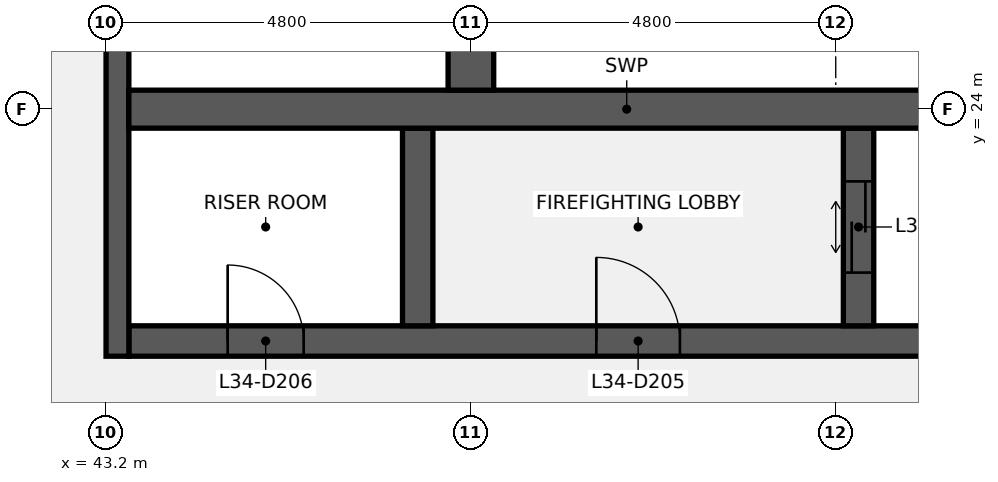
"""IFC4 building model, lengths in metres.
Left out: names, types, materials, properties, quantities, classifications, styles, units other than length and angle.
Written with IfcOpenShell. Run it as: python <this file> out.ifc"""

import sys

from ifc_helpers import new_model, si_unit, direction, frame, frame_2d, origin, place, context, subcontext, project, spatial, rectangle, extrude, element, fill, save


model = new_model("IFC4")
c1 = context("Model", 3, precision=1e-05, world=origin(), true_north=direction((0.0, 1.0)))
c2 = subcontext(c1, "Body", "Model", "MODEL_VIEW")
j1 = project(units=[si_unit("LENGTHUNIT", "METRE"), si_unit("PLANEANGLEUNIT", "RADIAN")], contexts=[c1])
p1 = place(None, origin())
s1 = spatial("IfcSite", under=j1, at=p1, CompositionType="ELEMENT")
p2 = place(p1, origin())
s2 = spatial("IfcBuilding", under=s1, at=p2, CompositionType="ELEMENT")
p3 = place(p2, frame((0.0, 0.0, 156.1)))
s3 = spatial("IfcBuildingStorey", under=s2, at=p3, CompositionType="ELEMENT", Elevation=156.1)
p4 = place(p3, frame((43.5, 20.95, 0.0), z_axis=(0.0, 0.0, 1.0), x_axis=(1.0, 0.0, 0.0)))
e1 = element("IfcWall", 1, at=p4, inside=s3, PredefinedType="SHEAR", context=c2, shape_type="SweptSolid", body=[
    extrude(rectangle(XDim=13.1, YDim=0.4, at=frame_2d((6.55, 0.0))), origin(), (0.0, 0.0, 1.0), 3.84),
])
p5 = place(p4, frame((6.15, 0.0, 0.0)))
e2 = element("IfcOpeningElement", 2, at=p5, cuts=e1, PredefinedType="OPENING", context=c2, shape_type="SweptSolid", body=[
    extrude(rectangle(XDim=1.1, YDim=2.1, at=frame_2d((0.55, 1.05))), frame((0.0, 0.21, 0.0), z_axis=(0.0, -1.0, 0.0), x_axis=(1.0, 0.0, 0.0)), (0.0, 0.0, 1.0), 0.42),
])
p6 = place(p4, frame((1.3, 0.0, 0.0)))
e3 = element("IfcOpeningElement", 3, at=p6, cuts=e1, PredefinedType="OPENING", context=c2, shape_type="SweptSolid", body=[
    extrude(rectangle(XDim=1.0, YDim=2.1, at=frame_2d((0.5, 1.05))), frame((0.0, 0.21, 0.0), z_axis=(0.0, -1.0, 0.0), x_axis=(1.0, 0.0, 0.0)), (0.0, 0.0, 1.0), 0.42),
])
p7 = place(p3, frame((43.35, 20.75, 0.0), z_axis=(0.0, 0.0, 1.0), x_axis=(0.0, 1.0, 0.0)))
e4 = element("IfcWall", 4, at=p7, inside=s3, PredefinedType="SHEAR", context=c2, shape_type="SweptSolid", body=[
    extrude(rectangle(XDim=6.5, YDim=0.3, at=frame_2d((3.25, 0.0))), origin(), (0.0, 0.0, 1.0), 3.84),
])
p8 = place(p3, frame((53.1, 21.15, 0.0), z_axis=(0.0, 0.0, 1.0), x_axis=(0.0, 1.0, 0.0)))
e5 = element("IfcWall", 5, at=p8, inside=s3, PredefinedType="SHEAR", context=c2, shape_type="SweptSolid", body=[
    extrude(rectangle(XDim=2.6, YDim=0.4, at=frame_2d((1.3, 0.0))), origin(), (0.0, 0.0, 1.0), 3.84),
])
p9 = place(p8, frame((0.7, 0.0, 0.0)))
e6 = element("IfcOpeningElement", 6, at=p9, cuts=e5, PredefinedType="OPENING", context=c2, shape_type="SweptSolid", body=[
    extrude(rectangle(XDim=1.2, YDim=2.1, at=frame_2d((0.6, 1.05))), frame((0.0, 0.21, 0.0), z_axis=(0.0, -1.0, 0.0), x_axis=(1.0, 0.0, 0.0)), (0.0, 0.0, 1.0), 0.42),
])
p10 = place(p3, frame((47.3, 21.15, 0.0), z_axis=(0.0, 0.0, 1.0), x_axis=(0.0, 1.0, 0.0)))
e7 = element("IfcWall", 7, at=p10, inside=s3, PredefinedType="SHEAR", context=c2, shape_type="SweptSolid", body=[
    extrude(rectangle(XDim=2.6, YDim=0.4, at=frame_2d((1.3, 0.0))), origin(), (0.0, 0.0, 1.0), 3.84),
])
p11 = place(p3, frame((43.5, 24.0, 0.0), z_axis=(0.0, 0.0, 1.0), x_axis=(1.0, 0.0, 0.0)))
e8 = element("IfcWall", 8, at=p11, inside=s3, PredefinedType="SHEAR", context=c2, shape_type="SweptSolid", body=[
    extrude(rectangle(XDim=13.1, YDim=0.5, at=frame_2d((6.55, 0.0))), origin(), (0.0, 0.0, 1.0), 3.84),
])
p12 = place(p3, frame((48.0, 24.25, 0.0), z_axis=(0.0, 0.0, 1.0), x_axis=(0.0, 1.0, 0.0)))
e9 = element("IfcWall", 9, at=p12, inside=s3, PredefinedType="SHEAR", context=c2, shape_type="SweptSolid", body=[
    extrude(rectangle(XDim=2.6, YDim=0.6, at=frame_2d((1.3, 0.0))), origin(), (0.0, 0.0, 1.0), 3.84),
])
p13 = place(p5, origin())
e10 = element("IfcDoor", 10, at=p13, inside=s3, OperationType="SINGLE_SWING_LEFT", PredefinedType="DOOR", context=c2, shape_type="SweptSolid", body=[
    extrude(rectangle(XDim=1.1, YDim=2.1, at=frame_2d((0.55, 1.05))), frame((0.0, 0.025, 0.0), z_axis=(0.0, -1.0, 0.0), x_axis=(1.0, 0.0, 0.0)), (0.0, 0.0, 1.0), 0.05),
])
fill(e2, e10)
p14 = place(p6, origin())
e11 = element("IfcDoor", 11, at=p14, inside=s3, OperationType="SINGLE_SWING_LEFT", PredefinedType="DOOR", context=c2, shape_type="SweptSolid", body=[
    extrude(rectangle(XDim=1.0, YDim=2.1, at=frame_2d((0.5, 1.05))), frame((0.0, 0.025, 0.0), z_axis=(0.0, -1.0, 0.0), x_axis=(1.0, 0.0, 0.0)), (0.0, 0.0, 1.0), 0.05),
])
fill(e3, e11)
p15 = place(p9, origin())
e12 = element("IfcDoor", 12, at=p15, inside=s3, OperationType="DOUBLE_DOOR_SLIDING", PredefinedType="DOOR", context=c2, shape_type="SweptSolid", body=[
    extrude(rectangle(XDim=1.2, YDim=2.1, at=frame_2d((0.6, 1.05))), frame((0.0, 0.025, 0.0), z_axis=(0.0, -1.0, 0.0), x_axis=(1.0, 0.0, 0.0)), (0.0, 0.0, 1.0), 0.05),
])
fill(e6, e12)
save(model, sys.argv[1])
